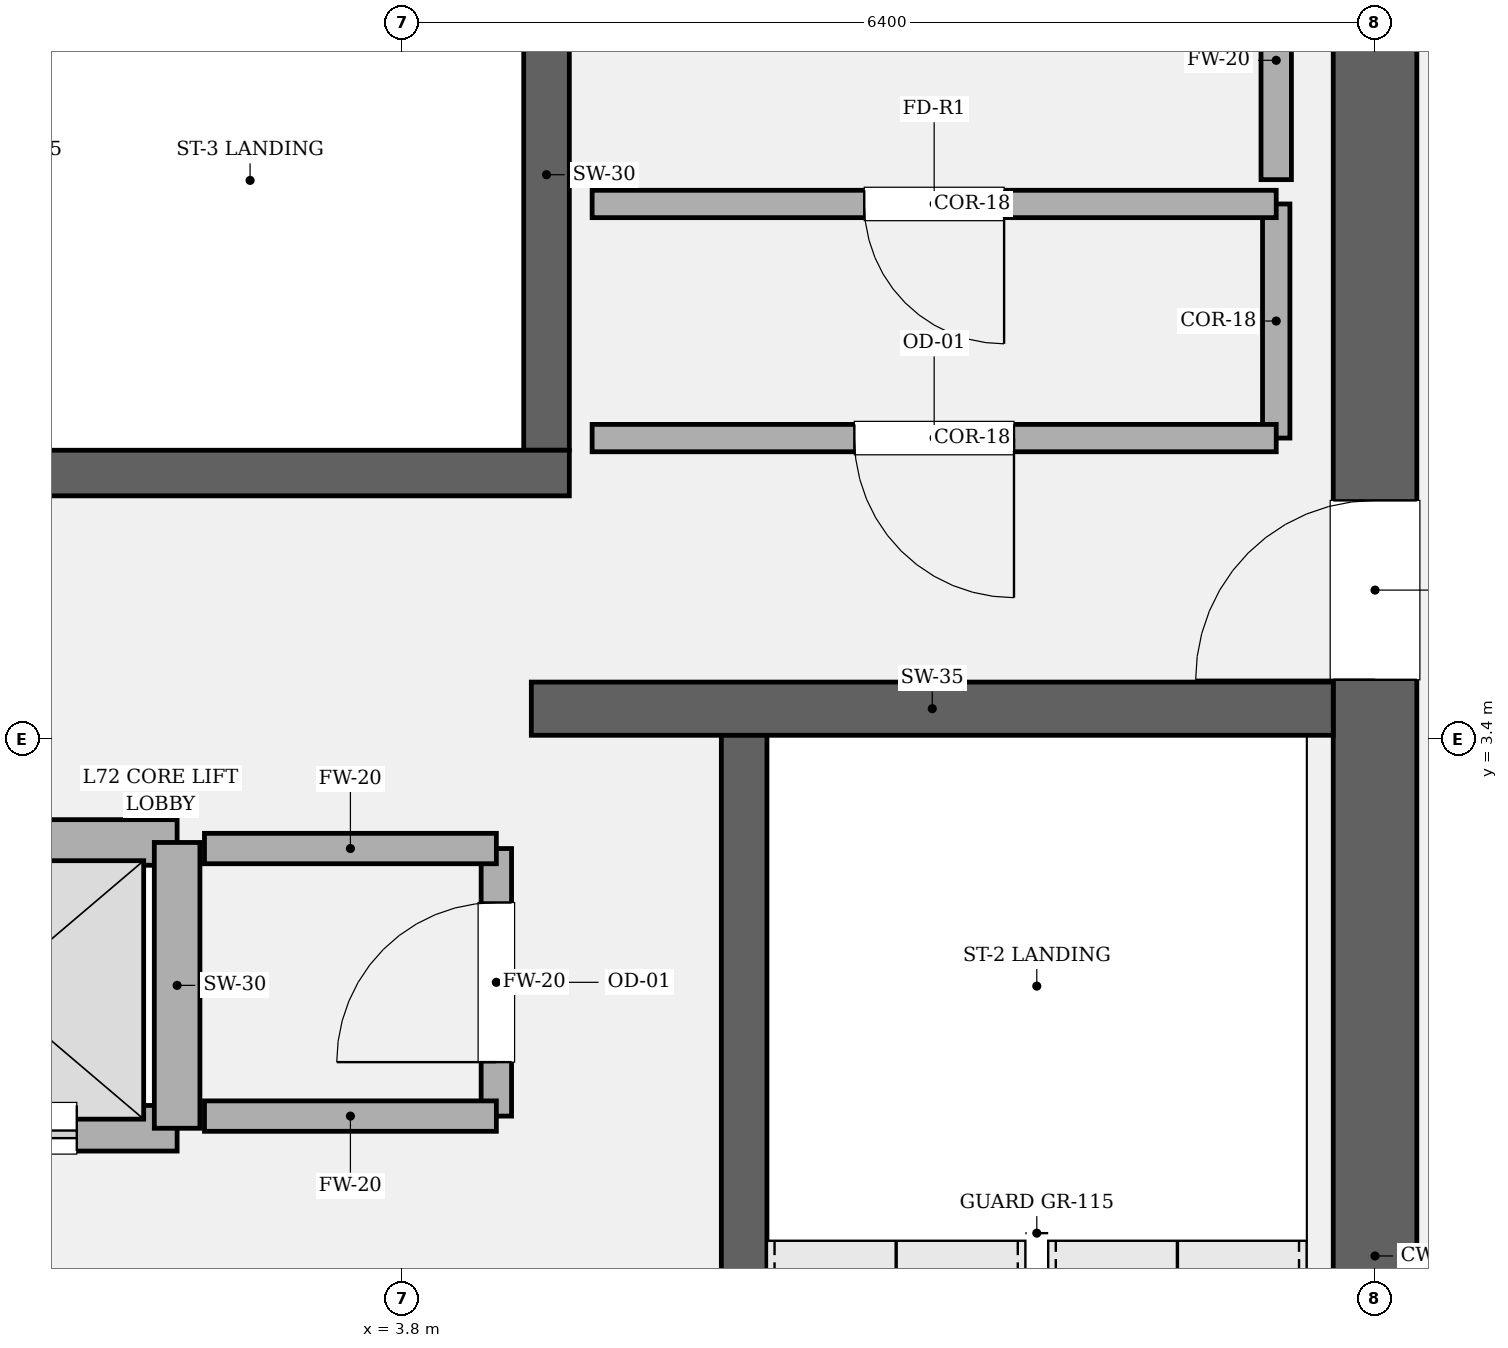
"""IFC4 building model, lengths in metres.
Left out: names, types, materials, properties, quantities, classifications, styles, units other than length and angle.
Written with IfcOpenShell. Run it as: python <this file> out.ifc"""

import sys

from ifc_helpers import new_model, si_unit, direction, frame, frame_2d, origin, place, context, subcontext, project, spatial, rectangle, extrude, element, fill, save


model = new_model("IFC4")
c1 = context("Model", 3, precision=1e-05, world=origin(), true_north=direction((0.0, 1.0)))
c2 = subcontext(c1, "Body", "Model", "MODEL_VIEW")
j1 = project(units=[si_unit("LENGTHUNIT", "METRE"), si_unit("PLANEANGLEUNIT", "RADIAN")], contexts=[c1])
p1 = place(None, origin())
s1 = spatial("IfcSite", under=j1, at=p1, CompositionType="ELEMENT")
p2 = place(p1, origin())
s2 = spatial("IfcBuilding", under=s1, at=p2, CompositionType="ELEMENT")
p3 = place(p2, frame((0.0, 0.0, 304.8)))
s3 = spatial("IfcBuildingStorey", under=s2, at=p3, CompositionType="ELEMENT", Elevation=304.8)
p4 = place(p3, frame((10.2, 8.925, 0.0), z_axis=(0.0, 0.0, 1.0), x_axis=(0.0, -1.0, 0.0)))
e1 = element("IfcWall", 1, at=p4, inside=s3, PredefinedType="SHEAR", context=c2, shape_type="SweptSolid", body=[
    extrude(rectangle(XDim=17.85, YDim=0.55, at=frame_2d((8.925, 0.0))), origin(), (0.0, 0.0, 1.0), 4.2),
])
p5 = place(p4, frame((3.955, 0.0, 0.0)))
e2 = element("IfcOpeningElement", 2, at=p5, cuts=e1, PredefinedType="OPENING", context=c2, shape_type="SweptSolid", body=[
    extrude(rectangle(XDim=1.18, YDim=2.2, at=frame_2d((0.59, 1.1))), frame((0.0, 0.285, 0.0), z_axis=(0.0, -1.0, 0.0), x_axis=(1.0, 0.0, 0.0)), (0.0, 0.0, 1.0), 0.57),
])
p6 = place(p3, frame((6.05, 3.45, 0.0), z_axis=(0.0, 0.0, 1.0), x_axis=(0.0, -1.0, 0.0)))
e3 = element("IfcWall", 3, at=p6, inside=s3, PredefinedType="SOLIDWALL", context=c2, shape_type="SweptSolid", body=[
    extrude(rectangle(XDim=8.95, YDim=0.3, at=frame_2d((4.475, 0.0))), origin(), (0.0, 0.0, 1.0), 4.2),
])
p7 = place(p3, frame((4.75, 8.925, 0.0), z_axis=(0.0, 0.0, 1.0), x_axis=(0.0, -1.0, 0.0)))
e4 = element("IfcWall", 4, at=p7, inside=s3, PredefinedType="SOLIDWALL", context=c2, shape_type="SweptSolid", body=[
    extrude(rectangle(XDim=3.625, YDim=0.3, at=frame_2d((1.812, 0.0))), origin(), (0.0, 0.0, 1.0), 4.2),
])
p8 = place(p3, frame((-4.9, 5.15, 0.0), z_axis=(0.0, 0.0, 1.0), x_axis=(1.0, 0.0, 0.0)))
e5 = element("IfcWall", 5, at=p8, inside=s3, PredefinedType="SOLIDWALL", context=c2, shape_type="SweptSolid", body=[
    extrude(rectangle(XDim=9.8, YDim=0.3, at=frame_2d((4.9, 0.0))), origin(), (0.0, 0.0, 1.0), 4.2),
])
p9 = place(p8, frame((0.56, 0.0, 0.0)))
e6 = element("IfcOpeningElement", 6, at=p9, cuts=e5, PredefinedType="OPENING", context=c2, shape_type="SweptSolid", body=[
    extrude(rectangle(XDim=1.18, YDim=2.2, at=frame_2d((0.59, 1.1))), frame((0.0, 0.16, 0.0), z_axis=(0.0, -1.0, 0.0), x_axis=(1.0, 0.0, 0.0)), (0.0, 0.0, 1.0), 0.32),
])
p10 = place(p3, frame((4.65, 3.6, 0.0), z_axis=(0.0, 0.0, 1.0), x_axis=(1.0, 0.0, 0.0)))
e7 = element("IfcWall", 7, at=p10, inside=s3, PredefinedType="SOLIDWALL", context=c2, shape_type="SweptSolid", body=[
    extrude(rectangle(XDim=5.275, YDim=0.35, at=frame_2d((2.638, 0.0))), origin(), (0.0, 0.0, 1.0), 4.2),
])
p11 = place(p3, frame((-2.32, 0.84, 0.0), z_axis=(0.0, 0.0, 1.0), x_axis=(1.0, 0.0, 0.0)))
e8 = element("IfcWall", 8, at=p11, inside=s3, PredefinedType="SOLIDWALL", context=c2, shape_type="SweptSolid", body=[
    extrude(rectangle(XDim=4.64, YDim=0.3, at=frame_2d((2.32, 0.0))), origin(), (0.0, 0.0, 1.0), 4.0),
])
p12 = place(p11, frame((0.66, 0.0, 0.0)))
e9 = element("IfcOpeningElement", 9, at=p12, cuts=e8, PredefinedType="OPENING", context=c2, shape_type="SweptSolid", body=[
    extrude(rectangle(XDim=1.12, YDim=2.25, at=frame_2d((0.56, 1.125))), frame((0.0, 0.16, 0.0), z_axis=(0.0, -1.0, 0.0), x_axis=(1.0, 0.0, 0.0)), (0.0, 0.0, 1.0), 0.32),
])
p13 = place(p11, frame((2.86, 0.0, 0.0)))
e10 = element("IfcOpeningElement", 10, at=p13, cuts=e8, PredefinedType="OPENING", context=c2, shape_type="SweptSolid", body=[
    extrude(rectangle(XDim=1.12, YDim=2.25, at=frame_2d((0.56, 1.125))), frame((0.0, 0.16, 0.0), z_axis=(0.0, -1.0, 0.0), x_axis=(1.0, 0.0, 0.0)), (0.0, 0.0, 1.0), 0.32),
])
p14 = place(p3, frame((-2.32, 2.72, 0.0), z_axis=(0.0, 0.0, 1.0), x_axis=(1.0, 0.0, 0.0)))
e11 = element("IfcWall", 11, at=p14, inside=s3, PredefinedType="SOLIDWALL", context=c2, shape_type="SweptSolid", body=[
    extrude(rectangle(XDim=4.64, YDim=0.3, at=frame_2d((2.32, 0.0))), origin(), (0.0, 0.0, 1.0), 4.0),
])
p15 = place(p3, frame((2.32, 0.84, 0.0), z_axis=(0.0, 0.0, 1.0), x_axis=(0.0, 1.0, 0.0)))
e12 = element("IfcWall", 12, at=p15, inside=s3, PredefinedType="SOLIDWALL", context=c2, shape_type="SweptSolid", body=[
    extrude(rectangle(XDim=1.88, YDim=0.3, at=frame_2d((0.94, 0.0))), origin(), (0.0, 0.0, 1.0), 4.0),
])
p16 = place(p3, frame((4.42, 0.92, 0.0), z_axis=(0.0, 0.0, 1.0), x_axis=(0.0, 1.0, 0.0)))
e13 = element("IfcWall", 13, at=p16, inside=s3, PredefinedType="SOLIDWALL", context=c2, shape_type="SweptSolid", body=[
    extrude(rectangle(XDim=1.76, YDim=0.2, at=frame_2d((0.88, 0.0))), origin(), (0.0, 0.0, 1.0), 4.0),
])
p17 = place(p16, frame((0.355, 0.0, 0.0)))
e14 = element("IfcOpeningElement", 14, at=p17, cuts=e13, PredefinedType="OPENING", context=c2, shape_type="SweptSolid", body=[
    extrude(rectangle(XDim=1.05, YDim=2.2, at=frame_2d((0.525, 1.1))), frame((0.0, 0.11, 0.0), z_axis=(0.0, -1.0, 0.0), x_axis=(1.0, 0.0, 0.0)), (0.0, 0.0, 1.0), 0.22),
])
for number, where, z_axis, x_axis in (
    (15, (4.42, 2.68, 0.0), (0.0, 0.0, 1.0), (-1.0, 0.0, 0.0)),
    (16, (2.5, 0.92, 0.0), (0.0, 0.0, 1.0), (1.0, 0.0, 0.0)),
):
    element("IfcWall", number, at=place(p3, frame(where, z_axis=z_axis, x_axis=x_axis)), inside=s3, PredefinedType="SOLIDWALL", context=c2, shape_type="SweptSolid", body=[
        extrude(rectangle(XDim=1.92, YDim=0.2, at=frame_2d((0.96, 0.0))), origin(), (0.0, 0.0, 1.0), 4.0),
    ])
p18 = place(p3, frame((9.55, 5.38, 0.0), z_axis=(0.0, 0.0, 1.0), x_axis=(0.0, 1.0, 0.0)))
e17 = element("IfcWall", 17, at=p18, inside=s3, PredefinedType="PARTITIONING", context=c2, shape_type="SweptSolid", body=[
    extrude(rectangle(XDim=1.54, YDim=0.18, at=frame_2d((0.77, 0.0))), origin(), (0.0, 0.0, 1.0), 4.0),
])
p19 = place(p3, frame((9.55, 6.92, 0.0), z_axis=(0.0, 0.0, 1.0), x_axis=(-1.0, 0.0, 0.0)))
e18 = element("IfcWall", 18, at=p19, inside=s3, PredefinedType="PARTITIONING", context=c2, shape_type="SweptSolid", body=[
    extrude(rectangle(XDim=4.5, YDim=0.18, at=frame_2d((2.25, 0.0))), origin(), (0.0, 0.0, 1.0), 4.0),
])
p20 = place(p19, frame((1.79, 0.0, 0.0)))
e19 = element("IfcOpeningElement", 19, at=p20, cuts=e18, PredefinedType="OPENING", context=c2, shape_type="SweptSolid", body=[
    extrude(rectangle(XDim=0.92, YDim=2.1, at=frame_2d((0.46, 1.05))), frame((0.0, 0.1, 0.0), z_axis=(0.0, -1.0, 0.0), x_axis=(1.0, 0.0, 0.0)), (0.0, 0.0, 1.0), 0.2),
])
p21 = place(p3, frame((5.05, 5.38, 0.0), z_axis=(0.0, 0.0, 1.0), x_axis=(1.0, 0.0, 0.0)))
e20 = element("IfcWall", 20, at=p21, inside=s3, PredefinedType="PARTITIONING", context=c2, shape_type="SweptSolid", body=[
    extrude(rectangle(XDim=4.5, YDim=0.18, at=frame_2d((2.25, 0.0))), origin(), (0.0, 0.0, 1.0), 4.0),
])
p22 = place(p21, frame((1.725, 0.0, 0.0)))
e21 = element("IfcOpeningElement", 21, at=p22, cuts=e20, PredefinedType="OPENING", context=c2, shape_type="SweptSolid", body=[
    extrude(rectangle(XDim=1.05, YDim=2.2, at=frame_2d((0.525, 1.1))), frame((0.0, 0.1, 0.0), z_axis=(0.0, -1.0, 0.0), x_axis=(1.0, 0.0, 0.0)), (0.0, 0.0, 1.0), 0.2),
])
p23 = place(p3, frame((9.55, 7.08, 0.0), z_axis=(0.0, 0.0, 1.0), x_axis=(0.0, 1.0, 0.0)))
e22 = element("IfcWall", 22, at=p23, inside=s3, PredefinedType="SOLIDWALL", context=c2, shape_type="SweptSolid", body=[
    extrude(rectangle(XDim=1.57, YDim=0.2, at=frame_2d((0.785, 0.0))), origin(), (0.0, 0.0, 1.0), 4.0),
])
p24 = place(p5, origin())
e23 = element("IfcDoor", 23, at=p24, inside=s3, OperationType="SINGLE_SWING_RIGHT", PredefinedType="DOOR", context=c2, shape_type="SweptSolid", body=[
    extrude(rectangle(XDim=1.18, YDim=2.2, at=frame_2d((0.59, 1.1))), frame((0.0, 0.025, 0.0), z_axis=(0.0, -1.0, 0.0), x_axis=(1.0, 0.0, 0.0)), (0.0, 0.0, 1.0), 0.05),
])
fill(e2, e23)
p25 = place(p13, origin())
e24 = element("IfcDoor", 24, at=p25, inside=s3, OperationType="DOUBLE_DOOR_SLIDING", PredefinedType="DOOR", context=c2, shape_type="SweptSolid", body=[
    extrude(rectangle(XDim=1.12, YDim=2.25, at=frame_2d((0.56, 1.125))), frame((0.0, 0.025, 0.0), z_axis=(0.0, -1.0, 0.0), x_axis=(1.0, 0.0, 0.0)), (0.0, 0.0, 1.0), 0.05),
])
fill(e10, e24)
p26 = place(p17, origin())
e25 = element("IfcDoor", 25, at=p26, inside=s3, OperationType="SINGLE_SWING_LEFT", PredefinedType="DOOR", context=c2, shape_type="SweptSolid", body=[
    extrude(rectangle(XDim=1.05, YDim=2.2, at=frame_2d((0.525, 1.1))), frame((0.0, 0.025, 0.0), z_axis=(0.0, -1.0, 0.0), x_axis=(1.0, 0.0, 0.0)), (0.0, 0.0, 1.0), 0.05),
])
fill(e14, e25)
p27 = place(p22, origin())
e26 = element("IfcDoor", 26, at=p27, inside=s3, OperationType="SINGLE_SWING_RIGHT", PredefinedType="DOOR", context=c2, shape_type="SweptSolid", body=[
    extrude(rectangle(XDim=1.05, YDim=2.2, at=frame_2d((0.525, 1.1))), frame((0.0, 0.025, 0.0), z_axis=(0.0, -1.0, 0.0), x_axis=(1.0, 0.0, 0.0)), (0.0, 0.0, 1.0), 0.05),
])
fill(e21, e26)
p28 = place(p20, origin())
e27 = element("IfcDoor", 27, at=p28, inside=s3, OperationType="SINGLE_SWING_LEFT", PredefinedType="DOOR", context=c2, shape_type="SweptSolid", body=[
    extrude(rectangle(XDim=0.92, YDim=2.1, at=frame_2d((0.46, 1.05))), frame((0.0, 0.025, 0.0), z_axis=(0.0, -1.0, 0.0), x_axis=(1.0, 0.0, 0.0)), (0.0, 0.0, 1.0), 0.05),
])
fill(e19, e27)
save(model, sys.argv[1])
